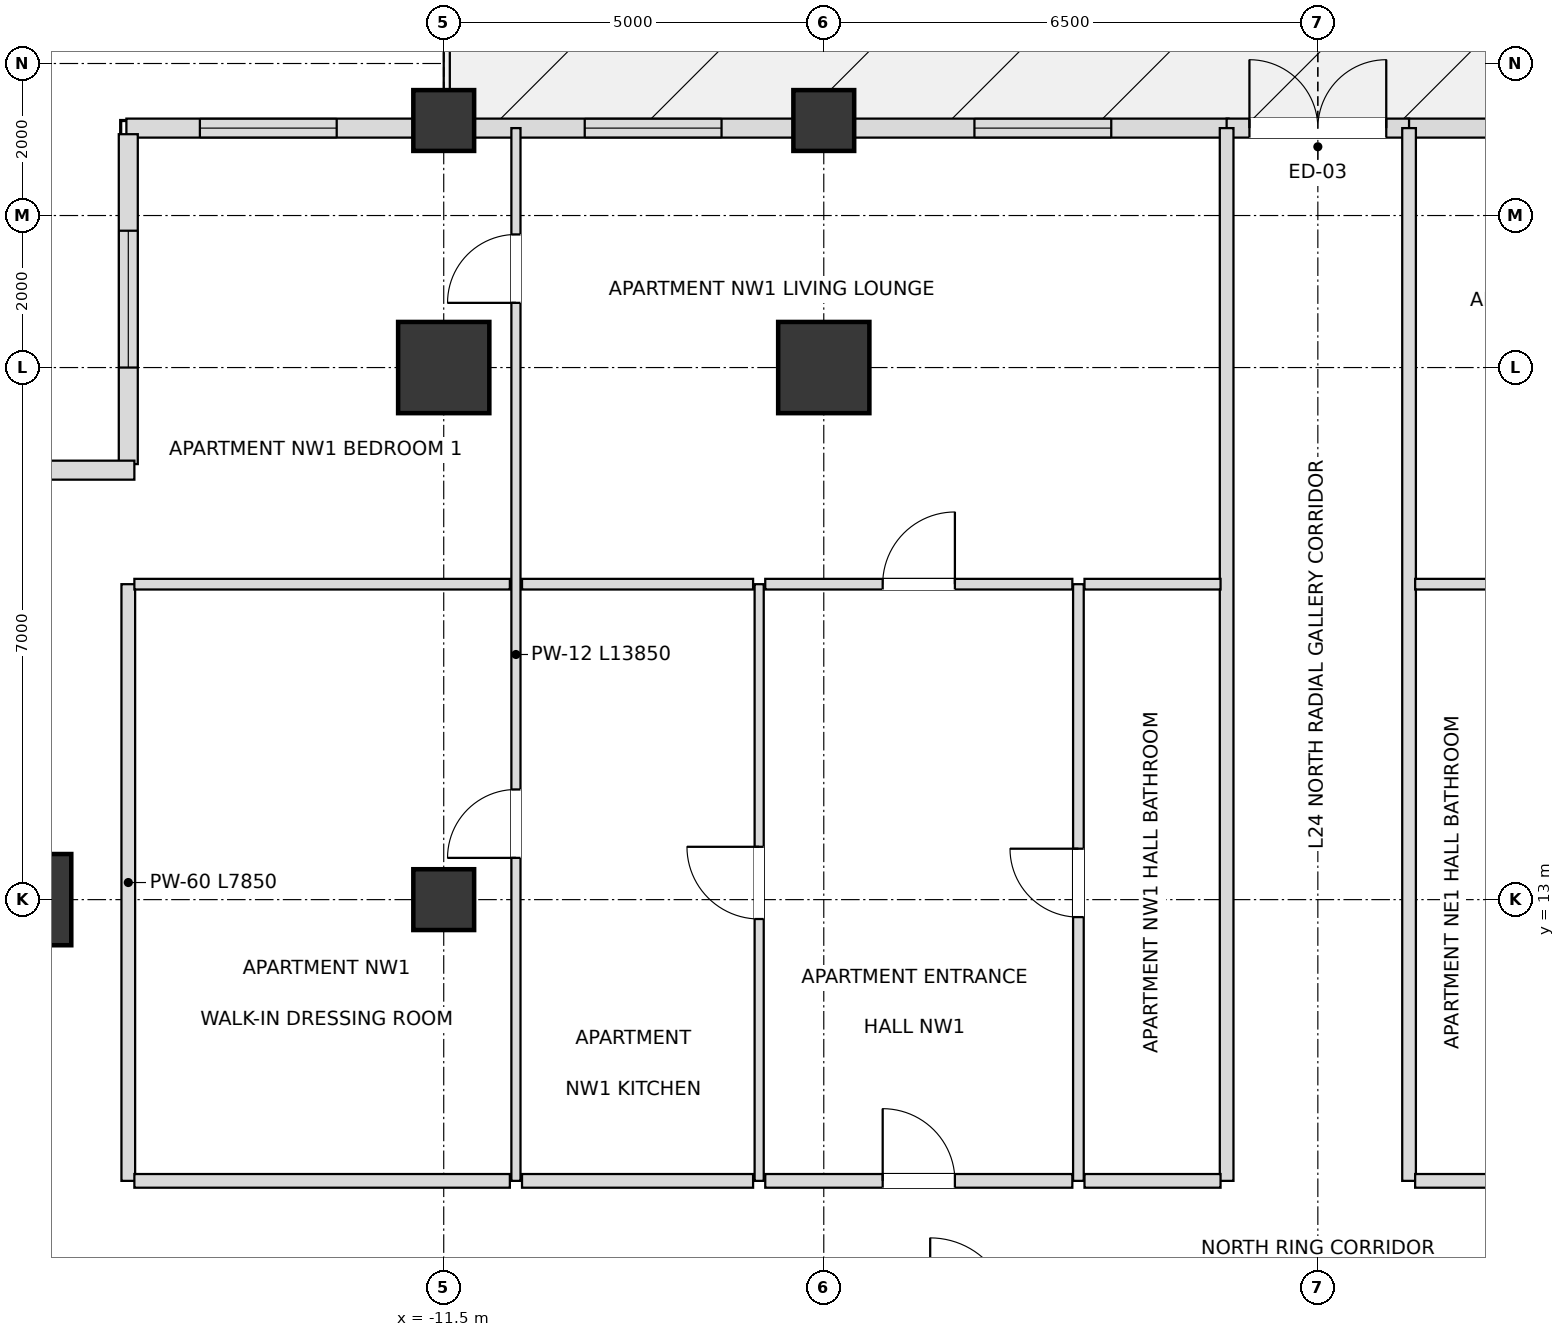
"""IFC4 building model, lengths in metres.
Left out: names, types, materials, properties, quantities, classifications, styles, units other than length and angle.
Written with IfcOpenShell. Run it as: python <this file> out.ifc"""

import sys

from ifc_helpers import new_model, si_unit, direction, frame, frame_2d, origin, origin_2d, place, context, subcontext, project, spatial, rectangle, extrude, element, fill, save


model = new_model("IFC4")
c1 = context("Model", 3, precision=1e-05, world=origin(), true_north=direction((0.0, 1.0)))
c2 = subcontext(c1, "Body", "Model", "MODEL_VIEW")
j1 = project(units=[si_unit("LENGTHUNIT", "METRE"), si_unit("PLANEANGLEUNIT", "RADIAN")], contexts=[c1])
p1 = place(None, origin())
s1 = spatial("IfcSite", under=j1, at=p1, CompositionType="ELEMENT")
p2 = place(p1, origin())
s2 = spatial("IfcBuilding", under=s1, at=p2, CompositionType="ELEMENT")
p3 = place(p2, frame((0.0, 0.0, 99.0)))
s3 = spatial("IfcBuildingStorey", under=s2, at=p3, CompositionType="ELEMENT", Elevation=99.0)
for number, where, z_axis, x_axis in (
    (1, (-6.5, 20.0, 0.0), (0.0, 0.0, 1.0), (1.0, 0.0, 0.0)),
    (2, (-11.5, 20.0, 0.0), (0.0, 0.0, 1.0), (1.0, 0.0, 0.0)),
    (3, (-17.0, 13.0, 0.0), (0.0, 0.0, 1.0), (1.0, 0.0, 0.0)),
):
    element("IfcColumn", number, at=place(p3, frame(where, z_axis=z_axis, x_axis=x_axis)), inside=s3, PredefinedType="USERDEFINED", context=c2, shape_type="SweptSolid", body=[
        extrude(rectangle(XDim=1.2, YDim=1.2, at=origin_2d()), origin(), (0.0, 0.0, 1.0), 3.6),
    ])
for number, where, z_axis, x_axis in (
    (4, (-11.5, 13.0, 0.0), (0.0, 0.0, 1.0), (1.0, 0.0, 0.0)),
    (5, (-11.5, 23.25, 0.0), (0.0, 0.0, 1.0), (1.0, 0.0, 0.0)),
    (6, (-6.5, 23.25, 0.0), (0.0, 0.0, 1.0), (1.0, 0.0, 0.0)),
):
    element("IfcColumn", number, at=place(p3, frame(where, z_axis=z_axis, x_axis=x_axis)), inside=s3, PredefinedType="COLUMN", context=c2, shape_type="SweptSolid", body=[
        extrude(rectangle(XDim=0.8, YDim=0.8, at=origin_2d()), origin(), (0.0, 0.0, 1.0), 3.6),
    ])
p4 = place(p3, frame((6.105, 23.15, 0.0), z_axis=(0.0, 0.0, 1.0), x_axis=(-1.0, 0.0, 0.0)))
e7 = element("IfcWall", 7, at=p4, inside=s3, PredefinedType="SOLIDWALL", context=c2, shape_type="SweptSolid", body=[
    extrude(rectangle(XDim=4.93, YDim=0.25, at=frame_2d((2.465, 0.0))), origin(), (0.0, 0.0, 1.0), 2.736),
])
p5 = place(p4, frame((1.588, 0.0, 0.72)))
e8 = element("IfcOpeningElement", 8, at=p5, cuts=e7, PredefinedType="OPENING", context=c2, shape_type="SweptSolid", body=[
    extrude(rectangle(XDim=1.8, YDim=1.68, at=frame_2d((0.9, 0.84))), frame((0.0, 0.135, 0.0), z_axis=(0.0, -1.0, 0.0), x_axis=(1.0, 0.0, 0.0)), (0.0, 0.0, 1.0), 0.27),
])
p6 = place(p3, frame((-1.175, 23.15, 0.0), z_axis=(0.0, 0.0, 1.0), x_axis=(-1.0, 0.0, 0.0)))
e9 = element("IfcWall", 9, at=p6, inside=s3, PredefinedType="SOLIDWALL", context=c2, shape_type="SweptSolid", body=[
    extrude(rectangle(XDim=4.93, YDim=0.25, at=frame_2d((2.465, 0.0))), origin(), (0.0, 0.0, 1.0), 2.736),
])
p7 = place(p6, frame((1.543, 0.0, 0.72)))
e10 = element("IfcOpeningElement", 10, at=p7, cuts=e9, PredefinedType="OPENING", context=c2, shape_type="SweptSolid", body=[
    extrude(rectangle(XDim=1.8, YDim=1.68, at=frame_2d((0.9, 0.84))), frame((0.0, 0.135, 0.0), z_axis=(0.0, -1.0, 0.0), x_axis=(1.0, 0.0, 0.0)), (0.0, 0.0, 1.0), 0.27),
])
p8 = place(p3, frame((-6.895, 23.15, 0.0), z_axis=(0.0, 0.0, 1.0), x_axis=(-1.0, 0.0, 0.0)))
e11 = element("IfcWall", 11, at=p8, inside=s3, PredefinedType="SOLIDWALL", context=c2, shape_type="SweptSolid", body=[
    extrude(rectangle(XDim=4.21, YDim=0.25, at=frame_2d((2.105, 0.0))), origin(), (0.0, 0.0, 1.0), 2.736),
])
p9 = place(p8, frame((0.95, 0.0, 0.72)))
e12 = element("IfcOpeningElement", 12, at=p9, cuts=e11, PredefinedType="OPENING", context=c2, shape_type="SweptSolid", body=[
    extrude(rectangle(XDim=1.8, YDim=1.68, at=frame_2d((0.9, 0.84))), frame((0.0, 0.135, 0.0), z_axis=(0.0, -1.0, 0.0), x_axis=(1.0, 0.0, 0.0)), (0.0, 0.0, 1.0), 0.27),
])
p10 = place(p3, frame((-11.895, 23.15, 0.0), z_axis=(0.0, 0.0, 1.0), x_axis=(-1.0, 0.0, 0.0)))
e13 = element("IfcWall", 13, at=p10, inside=s3, PredefinedType="SOLIDWALL", context=c2, shape_type="SweptSolid", body=[
    extrude(rectangle(XDim=3.78, YDim=0.25, at=frame_2d((1.89, 0.0))), origin(), (0.0, 0.0, 1.0), 2.736),
])
p11 = place(p10, frame((1.013, 0.0, 0.72)))
e14 = element("IfcOpeningElement", 14, at=p11, cuts=e13, PredefinedType="OPENING", context=c2, shape_type="SweptSolid", body=[
    extrude(rectangle(XDim=1.8, YDim=1.68, at=frame_2d((0.9, 0.84))), frame((0.0, 0.135, 0.0), z_axis=(0.0, -1.0, 0.0), x_axis=(1.0, 0.0, 0.0)), (0.0, 0.0, 1.0), 0.27),
])
p12 = place(p3, frame((-1.2, 23.15, 0.0), z_axis=(0.0, 0.0, 1.0), x_axis=(1.0, 0.0, 0.0)))
e15 = element("IfcWall", 15, at=p12, inside=s3, PredefinedType="SOLIDWALL", context=c2, shape_type="SweptSolid", body=[
    extrude(rectangle(XDim=2.4, YDim=0.25, at=frame_2d((1.2, 0.0))), origin(), (0.0, 0.0, 1.0), 2.736),
])
p13 = place(p12, frame((0.3, 0.0, 0.0)))
e16 = element("IfcOpeningElement", 16, at=p13, cuts=e15, PredefinedType="OPENING", context=c2, shape_type="SweptSolid", body=[
    extrude(rectangle(XDim=1.8, YDim=2.3, at=frame_2d((0.9, 1.15))), frame((0.0, 0.135, 0.0), z_axis=(0.0, -1.0, 0.0), x_axis=(1.0, 0.0, 0.0)), (0.0, 0.0, 1.0), 0.27),
])
p14 = place(p3, frame((-15.65, 23.07, 0.0), z_axis=(0.0, 0.0, 1.0), x_axis=(0.0, -1.0, 0.0)))
e17 = element("IfcWall", 17, at=p14, inside=s3, PredefinedType="SOLIDWALL", context=c2, shape_type="SweptSolid", body=[
    extrude(rectangle(XDim=4.34, YDim=0.25, at=frame_2d((2.17, 0.0))), origin(), (0.0, 0.0, 1.0), 2.736),
])
p15 = place(p14, frame((1.27, 0.0, 0.72)))
e18 = element("IfcOpeningElement", 18, at=p15, cuts=e17, PredefinedType="OPENING", context=c2, shape_type="SweptSolid", body=[
    extrude(rectangle(XDim=1.8, YDim=1.68, at=frame_2d((0.9, 0.84))), frame((0.0, 0.135, 0.0), z_axis=(0.0, -1.0, 0.0), x_axis=(1.0, 0.0, 0.0)), (0.0, 0.0, 1.0), 0.27),
])
p16 = place(p3, frame((-15.57, 18.65, 0.0), z_axis=(0.0, 0.0, 1.0), x_axis=(-1.0, 0.0, 0.0)))
e19 = element("IfcWall", 19, at=p16, inside=s3, PredefinedType="SOLIDWALL", context=c2, shape_type="SweptSolid", body=[
    extrude(rectangle(XDim=4.66, YDim=0.25, at=frame_2d((2.33, 0.0))), origin(), (0.0, 0.0, 1.0), 2.736),
])
p17 = place(p16, frame((1.43, 0.0, 0.72)))
e20 = element("IfcOpeningElement", 20, at=p17, cuts=e19, PredefinedType="OPENING", context=c2, shape_type="SweptSolid", body=[
    extrude(rectangle(XDim=1.8, YDim=1.68, at=frame_2d((0.9, 0.84))), frame((0.0, 0.135, 0.0), z_axis=(0.0, -1.0, 0.0), x_axis=(1.0, 0.0, 0.0)), (0.0, 0.0, 1.0), 0.27),
])
p18 = place(p3, frame((-15.65, 9.3, 0.0), z_axis=(0.0, 0.0, 1.0), x_axis=(0.0, 1.0, 0.0)))
e21 = element("IfcWall", 21, at=p18, inside=s3, PredefinedType="PARTITIONING", context=c2, shape_type="SweptSolid", body=[
    extrude(rectangle(XDim=7.85, YDim=0.18, at=frame_2d((3.925, 0.0))), origin(), (0.0, 0.0, 1.0), 2.736),
])
p19 = place(p3, frame((-10.55, 9.3, 0.0), z_axis=(0.0, 0.0, 1.0), x_axis=(0.0, 1.0, 0.0)))
e22 = element("IfcWall", 22, at=p19, inside=s3, PredefinedType="PARTITIONING", context=c2, shape_type="SweptSolid", body=[
    extrude(rectangle(XDim=13.85, YDim=0.12, at=frame_2d((6.925, 0.0))), origin(), (0.0, 0.0, 1.0), 2.816),
])
p20 = place(p19, frame((4.249, 0.0, 0.0)))
e23 = element("IfcOpeningElement", 23, at=p20, cuts=e22, PredefinedType="OPENING", context=c2, shape_type="SweptSolid", body=[
    extrude(rectangle(XDim=0.9, YDim=2.1, at=frame_2d((0.45, 1.05))), frame((0.0, 0.07, 0.0), z_axis=(0.0, -1.0, 0.0), x_axis=(1.0, 0.0, 0.0)), (0.0, 0.0, 1.0), 0.14),
])
p21 = place(p19, frame((11.551, 0.0, 0.0)))
e24 = element("IfcOpeningElement", 24, at=p21, cuts=e22, PredefinedType="OPENING", context=c2, shape_type="SweptSolid", body=[
    extrude(rectangle(XDim=0.9, YDim=2.1, at=frame_2d((0.45, 1.05))), frame((0.0, 0.07, 0.0), z_axis=(0.0, -1.0, 0.0), x_axis=(1.0, 0.0, 0.0)), (0.0, 0.0, 1.0), 0.14),
])
p22 = place(p3, frame((-7.35, 9.3, 0.0), z_axis=(0.0, 0.0, 1.0), x_axis=(0.0, 1.0, 0.0)))
e25 = element("IfcWall", 25, at=p22, inside=s3, PredefinedType="PARTITIONING", context=c2, shape_type="SweptSolid", body=[
    extrude(rectangle(XDim=7.85, YDim=0.12, at=frame_2d((3.925, 0.0))), origin(), (0.0, 0.0, 1.0), 2.816),
])
p23 = place(p22, frame((3.445, 0.0, 0.0)))
e26 = element("IfcOpeningElement", 26, at=p23, cuts=e25, PredefinedType="OPENING", context=c2, shape_type="SweptSolid", body=[
    extrude(rectangle(XDim=0.95, YDim=2.1, at=frame_2d((0.475, 1.05))), frame((0.0, 0.07, 0.0), z_axis=(0.0, -1.0, 0.0), x_axis=(1.0, 0.0, 0.0)), (0.0, 0.0, 1.0), 0.14),
])
p24 = place(p3, frame((-3.15, 9.3, 0.0), z_axis=(0.0, 0.0, 1.0), x_axis=(0.0, 1.0, 0.0)))
e27 = element("IfcWall", 27, at=p24, inside=s3, PredefinedType="PARTITIONING", context=c2, shape_type="SweptSolid", body=[
    extrude(rectangle(XDim=7.85, YDim=0.14, at=frame_2d((3.925, 0.0))), origin(), (0.0, 0.0, 1.0), 3.38),
])
p25 = place(p24, frame((3.47, 0.0, 0.0)))
e28 = element("IfcOpeningElement", 28, at=p25, cuts=e27, PredefinedType="OPENING", context=c2, shape_type="SweptSolid", body=[
    extrude(rectangle(XDim=0.9, YDim=2.1, at=frame_2d((0.45, 1.05))), frame((0.0, 0.08, 0.0), z_axis=(0.0, -1.0, 0.0), x_axis=(1.0, 0.0, 0.0)), (0.0, 0.0, 1.0), 0.16),
])
for number, where, z_axis, x_axis in (
    (29, (-1.2, 9.3, 0.0), (0.0, 0.0, 1.0), (0.0, 1.0, 0.0)),
    (30, (1.2, 9.3, 0.0), (0.0, 0.0, 1.0), (0.0, 1.0, 0.0)),
):
    element("IfcWall", number, at=place(p3, frame(where, z_axis=z_axis, x_axis=x_axis)), inside=s3, PredefinedType="PARTITIONING", context=c2, shape_type="SweptSolid", body=[
        extrude(rectangle(XDim=13.85, YDim=0.18, at=frame_2d((6.925, 0.0))), origin(), (0.0, 0.0, 1.0), 2.816),
    ])
p26 = place(p3, frame((-15.57, 9.3, 0.0), z_axis=(0.0, 0.0, 1.0), x_axis=(1.0, 0.0, 0.0)))
e31 = element("IfcWall", 31, at=p26, inside=s3, PredefinedType="PARTITIONING", context=c2, shape_type="SweptSolid", body=[
    extrude(rectangle(XDim=4.94, YDim=0.18, at=frame_2d((2.47, 0.0))), origin(), (0.0, 0.0, 1.0), 3.38),
])
p27 = place(p3, frame((-10.47, 9.3, 0.0), z_axis=(0.0, 0.0, 1.0), x_axis=(1.0, 0.0, 0.0)))
e32 = element("IfcWall", 32, at=p27, inside=s3, PredefinedType="PARTITIONING", context=c2, shape_type="SweptSolid", body=[
    extrude(rectangle(XDim=3.04, YDim=0.18, at=frame_2d((1.52, 0.0))), origin(), (0.0, 0.0, 1.0), 3.38),
])
p28 = place(p3, frame((-7.27, 9.3, 0.0), z_axis=(0.0, 0.0, 1.0), x_axis=(1.0, 0.0, 0.0)))
e33 = element("IfcWall", 33, at=p28, inside=s3, PredefinedType="PARTITIONING", context=c2, shape_type="SweptSolid", body=[
    extrude(rectangle(XDim=4.04, YDim=0.18, at=frame_2d((2.02, 0.0))), origin(), (0.0, 0.0, 1.0), 2.816),
])
p29 = place(p28, frame((1.545, 0.0, 0.0)))
e34 = element("IfcOpeningElement", 34, at=p29, cuts=e33, PredefinedType="OPENING", context=c2, shape_type="SweptSolid", body=[
    extrude(rectangle(XDim=0.95, YDim=2.15, at=frame_2d((0.475, 1.075))), frame((0.0, 0.1, 0.0), z_axis=(0.0, -1.0, 0.0), x_axis=(1.0, 0.0, 0.0)), (0.0, 0.0, 1.0), 0.2),
])
for number, where, z_axis, x_axis in (
    (35, (-3.07, 9.3, 0.0), (0.0, 0.0, 1.0), (1.0, 0.0, 0.0)),
    (36, (1.28, 9.3, 0.0), (0.0, 0.0, 1.0), (1.0, 0.0, 0.0)),
):
    element("IfcWall", number, at=place(p3, frame(where, z_axis=z_axis, x_axis=x_axis)), inside=s3, PredefinedType="PARTITIONING", context=c2, shape_type="SweptSolid", body=[
        extrude(rectangle(XDim=1.79, YDim=0.18, at=frame_2d((0.895, 0.0))), origin(), (0.0, 0.0, 1.0), 3.38),
    ])
p30 = place(p3, frame((-15.57, 17.15, 0.0), z_axis=(0.0, 0.0, 1.0), x_axis=(1.0, 0.0, 0.0)))
e37 = element("IfcWall", 37, at=p30, inside=s3, PredefinedType="PARTITIONING", context=c2, shape_type="SweptSolid", body=[
    extrude(rectangle(XDim=4.94, YDim=0.14, at=frame_2d((2.47, 0.0))), origin(), (0.0, 0.0, 1.0), 2.736),
])
p31 = place(p3, frame((-10.47, 17.15, 0.0), z_axis=(0.0, 0.0, 1.0), x_axis=(1.0, 0.0, 0.0)))
e38 = element("IfcWall", 38, at=p31, inside=s3, PredefinedType="PARTITIONING", context=c2, shape_type="SweptSolid", body=[
    extrude(rectangle(XDim=3.04, YDim=0.14, at=frame_2d((1.52, 0.0))), origin(), (0.0, 0.0, 1.0), 3.38),
])
p32 = place(p3, frame((-7.27, 17.15, 0.0), z_axis=(0.0, 0.0, 1.0), x_axis=(1.0, 0.0, 0.0)))
e39 = element("IfcWall", 39, at=p32, inside=s3, PredefinedType="PARTITIONING", context=c2, shape_type="SweptSolid", body=[
    extrude(rectangle(XDim=4.04, YDim=0.14, at=frame_2d((2.02, 0.0))), origin(), (0.0, 0.0, 1.0), 2.816),
])
p33 = place(p32, frame((1.545, 0.0, 0.0)))
e40 = element("IfcOpeningElement", 40, at=p33, cuts=e39, PredefinedType="OPENING", context=c2, shape_type="SweptSolid", body=[
    extrude(rectangle(XDim=0.95, YDim=2.1, at=frame_2d((0.475, 1.05))), frame((0.0, 0.08, 0.0), z_axis=(0.0, -1.0, 0.0), x_axis=(1.0, 0.0, 0.0)), (0.0, 0.0, 1.0), 0.16),
])
for number, where, z_axis, x_axis in (
    (41, (-3.07, 17.15, 0.0), (0.0, 0.0, 1.0), (1.0, 0.0, 0.0)),
    (42, (1.28, 17.15, 0.0), (0.0, 0.0, 1.0), (1.0, 0.0, 0.0)),
):
    element("IfcWall", number, at=place(p3, frame(where, z_axis=z_axis, x_axis=x_axis)), inside=s3, PredefinedType="PARTITIONING", context=c2, shape_type="SweptSolid", body=[
        extrude(rectangle(XDim=1.79, YDim=0.14, at=frame_2d((0.895, 0.0))), origin(), (0.0, 0.0, 1.0), 3.38),
    ])
p34 = place(p7, origin())
e43 = element("IfcWindow", 43, at=p34, inside=s3, PartitioningType="SINGLE_PANEL", PredefinedType="WINDOW", context=c2, shape_type="SweptSolid", body=[
    extrude(rectangle(XDim=1.8, YDim=1.68, at=frame_2d((0.9, 0.84))), frame((0.0, 0.03, 0.0), z_axis=(0.0, -1.0, 0.0), x_axis=(1.0, 0.0, 0.0)), (0.0, 0.0, 1.0), 0.06),
])
fill(e10, e43)
p35 = place(p9, origin())
e44 = element("IfcWindow", 44, at=p35, inside=s3, PartitioningType="SINGLE_PANEL", PredefinedType="WINDOW", context=c2, shape_type="SweptSolid", body=[
    extrude(rectangle(XDim=1.8, YDim=1.68, at=frame_2d((0.9, 0.84))), frame((0.0, 0.03, 0.0), z_axis=(0.0, -1.0, 0.0), x_axis=(1.0, 0.0, 0.0)), (0.0, 0.0, 1.0), 0.06),
])
fill(e12, e44)
p36 = place(p11, origin())
e45 = element("IfcWindow", 45, at=p36, inside=s3, PartitioningType="SINGLE_PANEL", PredefinedType="WINDOW", context=c2, shape_type="SweptSolid", body=[
    extrude(rectangle(XDim=1.8, YDim=1.68, at=frame_2d((0.9, 0.84))), frame((0.0, 0.03, 0.0), z_axis=(0.0, -1.0, 0.0), x_axis=(1.0, 0.0, 0.0)), (0.0, 0.0, 1.0), 0.06),
])
fill(e14, e45)
p37 = place(p13, origin())
e46 = element("IfcDoor", 46, at=p37, inside=s3, OperationType="DOUBLE_DOOR_SINGLE_SWING", PredefinedType="DOOR", context=c2, shape_type="SweptSolid", body=[
    extrude(rectangle(XDim=1.8, YDim=2.3, at=frame_2d((0.9, 1.15))), frame((0.0, 0.025, 0.0), z_axis=(0.0, -1.0, 0.0), x_axis=(1.0, 0.0, 0.0)), (0.0, 0.0, 1.0), 0.05),
])
fill(e16, e46)
p38 = place(p15, origin())
e47 = element("IfcWindow", 47, at=p38, inside=s3, PartitioningType="SINGLE_PANEL", PredefinedType="WINDOW", context=c2, shape_type="SweptSolid", body=[
    extrude(rectangle(XDim=1.8, YDim=1.68, at=frame_2d((0.9, 0.84))), frame((0.0, 0.03, 0.0), z_axis=(0.0, -1.0, 0.0), x_axis=(1.0, 0.0, 0.0)), (0.0, 0.0, 1.0), 0.06),
])
fill(e18, e47)
p39 = place(p25, origin())
e48 = element("IfcDoor", 48, at=p39, inside=s3, OperationType="SINGLE_SWING_RIGHT", PredefinedType="DOOR", context=c2, shape_type="SweptSolid", body=[
    extrude(rectangle(XDim=0.9, YDim=2.1, at=frame_2d((0.45, 1.05))), frame((0.0, 0.025, 0.0), z_axis=(0.0, -1.0, 0.0), x_axis=(1.0, 0.0, 0.0)), (0.0, 0.0, 1.0), 0.05),
])
fill(e28, e48)
p40 = place(p29, origin())
e49 = element("IfcDoor", 49, at=p40, inside=s3, OperationType="SINGLE_SWING_LEFT", PredefinedType="DOOR", context=c2, shape_type="SweptSolid", body=[
    extrude(rectangle(XDim=0.95, YDim=2.15, at=frame_2d((0.475, 1.075))), frame((0.0, 0.025, 0.0), z_axis=(0.0, -1.0, 0.0), x_axis=(1.0, 0.0, 0.0)), (0.0, 0.0, 1.0), 0.05),
])
fill(e34, e49)
p41 = place(p23, origin())
e50 = element("IfcDoor", 50, at=p41, inside=s3, OperationType="SINGLE_SWING_RIGHT", PredefinedType="DOOR", context=c2, shape_type="SweptSolid", body=[
    extrude(rectangle(XDim=0.95, YDim=2.1, at=frame_2d((0.475, 1.05))), frame((0.0, 0.025, 0.0), z_axis=(0.0, -1.0, 0.0), x_axis=(1.0, 0.0, 0.0)), (0.0, 0.0, 1.0), 0.05),
])
fill(e26, e50)
p42 = place(p20, origin())
e51 = element("IfcDoor", 51, at=p42, inside=s3, OperationType="SINGLE_SWING_LEFT", PredefinedType="DOOR", context=c2, shape_type="SweptSolid", body=[
    extrude(rectangle(XDim=0.9, YDim=2.1, at=frame_2d((0.45, 1.05))), frame((0.0, 0.025, 0.0), z_axis=(0.0, -1.0, 0.0), x_axis=(1.0, 0.0, 0.0)), (0.0, 0.0, 1.0), 0.05),
])
fill(e23, e51)
p43 = place(p33, origin())
e52 = element("IfcDoor", 52, at=p43, inside=s3, OperationType="SINGLE_SWING_RIGHT", PredefinedType="DOOR", context=c2, shape_type="SweptSolid", body=[
    extrude(rectangle(XDim=0.95, YDim=2.1, at=frame_2d((0.475, 1.05))), frame((0.0, 0.025, 0.0), z_axis=(0.0, -1.0, 0.0), x_axis=(1.0, 0.0, 0.0)), (0.0, 0.0, 1.0), 0.05),
])
fill(e40, e52)
p44 = place(p21, origin())
e53 = element("IfcDoor", 53, at=p44, inside=s3, OperationType="SINGLE_SWING_LEFT", PredefinedType="DOOR", context=c2, shape_type="SweptSolid", body=[
    extrude(rectangle(XDim=0.9, YDim=2.1, at=frame_2d((0.45, 1.05))), frame((0.0, 0.025, 0.0), z_axis=(0.0, -1.0, 0.0), x_axis=(1.0, 0.0, 0.0)), (0.0, 0.0, 1.0), 0.05),
])
fill(e24, e53)
save(model, sys.argv[1])
